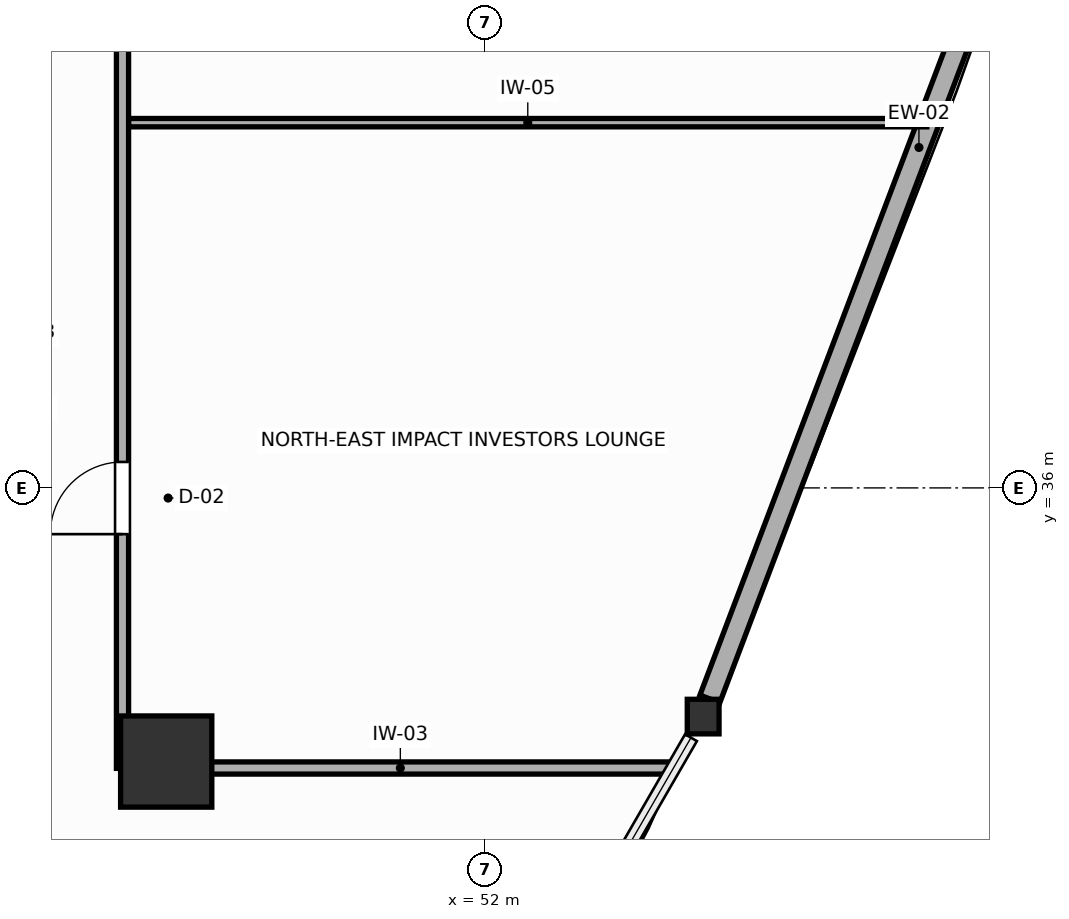
"""IFC4 building model, lengths in metres.
Left out: names, types, materials, properties, quantities, classifications, styles, units other than length and angle.
Written with IfcOpenShell. Run it as: python <this file> out.ifc"""

import sys

from ifc_helpers import new_model, si_unit, direction, frame, frame_2d, origin, origin_2d, place, context, subcontext, project, spatial, rectangle, i_section, extrude, source, transform, mapped, element, fill, save


model = new_model("IFC4")
c1 = context("Model", 3, precision=1e-05, world=origin(), true_north=direction((0.0, 1.0)))
c2 = subcontext(c1, "Body", "Model", "MODEL_VIEW")
j1 = project(units=[si_unit("LENGTHUNIT", "METRE"), si_unit("PLANEANGLEUNIT", "RADIAN")], contexts=[c1])
p1 = place(None, origin())
s1 = spatial("IfcSite", under=j1, at=p1, CompositionType="ELEMENT")
p2 = place(p1, origin())
s2 = spatial("IfcBuilding", under=s1, at=p2, CompositionType="ELEMENT")
p3 = place(p2, frame((0.0, 0.0, 127.8)))
s3 = spatial("IfcBuildingStorey", under=s2, at=p3, CompositionType="ELEMENT", Elevation=127.8)
m1 = source(origin(), c2, "Body", "SweptSolid", [
    extrude(rectangle(XDim=1.2, YDim=1.2, at=origin_2d()), origin(), (0.0, 0.0, 1.0), 3.6),
])
p4 = place(p3, frame((47.8, 32.4, 0.0), z_axis=(0.0, 0.0, 1.0), x_axis=(1.0, 0.0, 0.0)))
e1 = element("IfcColumn", 1, at=p4, inside=s3, PredefinedType="COLUMN", context=c2, shape_type="MappedRepresentation", body=[
    mapped(m1, transform((0.0, 0.0, 0.0), scale=1.0)),
])
m2 = source(origin(), c2, "Body", "SweptSolid", [
    extrude(i_section(OverallWidth=0.418, OverallDepth=0.455, WebThickness=0.039, FlangeThickness=0.063, FilletRadius=0.015, at=origin_2d()), origin(), (0.0, 0.0, 1.0), 3.6),
])
p5 = place(p3, frame((54.864, 32.991, 0.0), z_axis=(0.0, 0.0, 1.0), x_axis=(1.0, 0.0, 0.0)))
e2 = element("IfcColumn", 2, at=p5, inside=s3, PredefinedType="COLUMN", context=c2, shape_type="MappedRepresentation", body=[
    mapped(m2, transform((0.0, 0.0, 0.0), scale=1.0)),
])
p6 = place(p3, frame((54.952, 33.224, 0.0), z_axis=(0.0, 0.0, 1.0), x_axis=(0.354519532047, 0.935048609109, 0.0)))
e3 = element("IfcWall", 3, at=p6, inside=s3, PredefinedType="SOLIDWALL", context=c2, shape_type="SweptSolid", body=[
    extrude(rectangle(XDim=15.517, YDim=0.28, at=frame_2d((7.759, 0.0))), origin(), (0.0, 0.0, 1.0), 2.86),
])
p7 = place(p3, frame((47.225, 32.31, 0.0), z_axis=(0.0, 0.0, 1.0), x_axis=(0.0, 1.0, 0.0)))
e4 = element("IfcWall", 4, at=p7, inside=s3, PredefinedType="PARTITIONING", context=c2, shape_type="SweptSolid", body=[
    extrude(rectangle(XDim=20.796, YDim=0.16, at=frame_2d((10.398, 0.0))), origin(), (0.0, 0.0, 1.0), 3.26),
])
p8 = place(p7, frame((3.082, 0.0, 0.0)))
e5 = element("IfcOpeningElement", 5, at=p8, cuts=e4, PredefinedType="OPENING", context=c2, shape_type="SweptSolid", body=[
    extrude(rectangle(XDim=0.95, YDim=2.05, at=frame_2d((0.475, 1.025))), frame((0.0, 0.09, 0.0), z_axis=(0.0, -1.0, 0.0), x_axis=(1.0, 0.0, 0.0)), (0.0, 0.0, 1.0), 0.18),
])
p9 = place(p7, frame((11.46, 0.0, 0.0)))
e6 = element("IfcOpeningElement", 6, at=p9, cuts=e4, PredefinedType="OPENING", context=c2, shape_type="SweptSolid", body=[
    extrude(rectangle(XDim=0.95, YDim=2.05, at=frame_2d((0.475, 1.025))), frame((0.0, 0.09, 0.0), z_axis=(0.0, -1.0, 0.0), x_axis=(1.0, 0.0, 0.0)), (0.0, 0.0, 1.0), 0.18),
])
p10 = place(p3, frame((47.307, 32.315, 0.0), z_axis=(0.0, 0.0, 1.0), x_axis=(1.0, 0.0, 0.0)))
e7 = element("IfcWall", 7, at=p10, inside=s3, PredefinedType="PARTITIONING", context=c2, shape_type="SweptSolid", body=[
    extrude(rectangle(XDim=7.147, YDim=0.16, at=frame_2d((3.573, 0.0))), origin(), (0.0, 0.0, 1.0), 2.81),
])
p11 = place(p3, frame((47.307, 40.805, 0.0), z_axis=(0.0, 0.0, 1.0), x_axis=(1.0, 0.0, 0.0)))
e8 = element("IfcWall", 8, at=p11, inside=s3, PredefinedType="MOVABLE", context=c2, shape_type="SweptSolid", body=[
    extrude(rectangle(XDim=10.5, YDim=0.11, at=frame_2d((5.25, 0.0))), origin(), (0.0, 0.0, 1.0), 3.26),
])
p12 = place(p8, origin())
e9 = element("IfcDoor", 9, at=p12, inside=s3, OperationType="SINGLE_SWING_LEFT", PredefinedType="DOOR", context=c2, shape_type="SweptSolid", body=[
    extrude(rectangle(XDim=0.95, YDim=2.05, at=frame_2d((0.475, 1.025))), frame((0.0, 0.025, 0.0), z_axis=(0.0, -1.0, 0.0), x_axis=(1.0, 0.0, 0.0)), (0.0, 0.0, 1.0), 0.05),
])
fill(e5, e9)
save(model, sys.argv[1])
